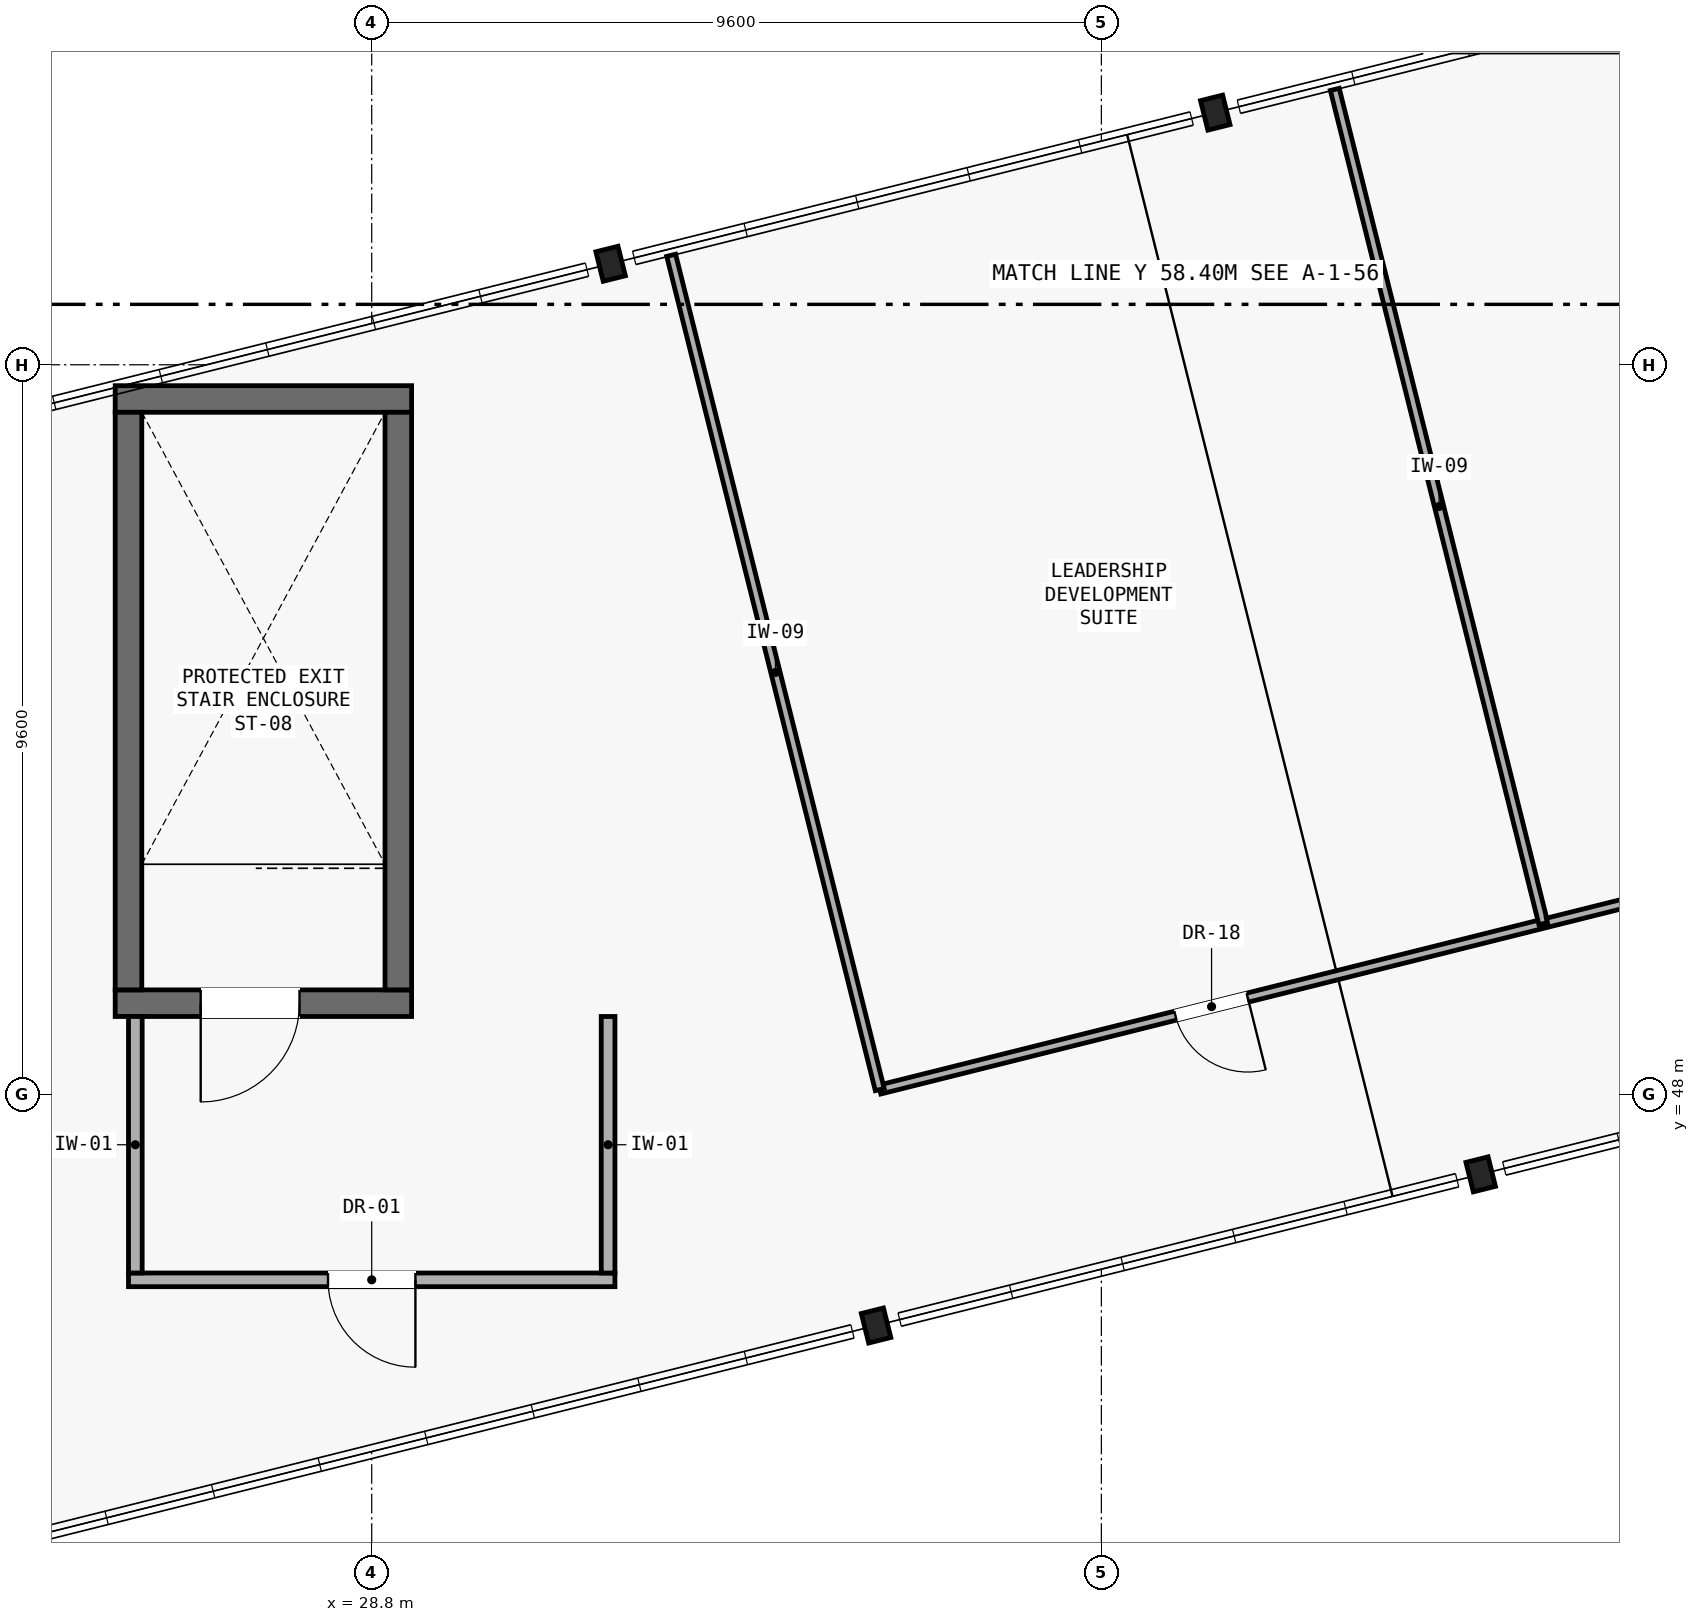
"""IFC4 building model, lengths in metres.
Left out: names, types, materials, properties, quantities, classifications, styles, units other than length and angle.
Written with IfcOpenShell. Run it as: python <this file> out.ifc"""

import sys

from ifc_helpers import new_model, si_unit, direction, frame, frame_2d, origin, origin_2d, place, context, subcontext, project, spatial, rectangle, i_section, extrude, element, fill, save


model = new_model("IFC4")
c1 = context("Model", 3, precision=1e-05, world=origin(), true_north=direction((0.0, 1.0)))
c2 = subcontext(c1, "Body", "Model", "MODEL_VIEW")
j1 = project(units=[si_unit("LENGTHUNIT", "METRE"), si_unit("PLANEANGLEUNIT", "RADIAN")], contexts=[c1])
p1 = place(None, origin())
s1 = spatial("IfcSite", under=j1, at=p1, CompositionType="ELEMENT")
p2 = place(p1, origin())
s2 = spatial("IfcBuilding", under=s1, at=p2, CompositionType="ELEMENT")
p3 = place(p2, frame((0.0, 0.0, 17.85)))
s3 = spatial("IfcBuildingStorey", under=s2, at=p3, CompositionType="ELEMENT", Elevation=17.85)
for number, where, z_axis, x_axis in (
    (1, (35.436, 44.959, 0.0), (0.0, 0.0, 1.0), (0.97, 0.243, 0.0)),
    (2, (31.943, 58.929, 0.0), (0.0, 0.0, 1.0), (0.97, 0.243, 0.0)),
    (3, (43.391, 46.948, 0.0), (0.0, 0.0, 1.0), (0.97, 0.243, 0.0)),
    (4, (39.898, 60.918, 0.0), (0.0, 0.0, 1.0), (0.97, 0.243, 0.0)),
):
    element("IfcColumn", number, at=place(p3, frame(where, z_axis=z_axis, x_axis=x_axis)), inside=s3, PredefinedType="COLUMN", context=c2, shape_type="SweptSolid", body=[
        extrude(i_section(OverallWidth=0.3, OverallDepth=0.4, WebThickness=0.013, FlangeThickness=0.024, FilletRadius=0.027, at=origin_2d()), origin(), (0.0, 0.0, 1.0), 4.2),
    ])
p4 = place(p3, frame((25.425, 49.2, 0.0), z_axis=(0.0, 0.0, 1.0), x_axis=(1.0, 0.0, 0.0)))
e5 = element("IfcWall", 5, at=p4, inside=s3, PredefinedType="SHEAR", context=c2, shape_type="SweptSolid", body=[
    extrude(rectangle(XDim=3.9, YDim=0.35, at=frame_2d((1.95, 0.0))), origin(), (0.0, 0.0, 1.0), 3.99),
])
p5 = place(p4, frame((1.125, 0.0, 0.0)))
e6 = element("IfcOpeningElement", 6, at=p5, cuts=e5, PredefinedType="OPENING", context=c2, shape_type="SweptSolid", body=[
    extrude(rectangle(XDim=1.3, YDim=2.15, at=frame_2d((0.65, 1.075))), frame((0.0, 0.185, 0.0), z_axis=(0.0, -1.0, 0.0), x_axis=(1.0, 0.0, 0.0)), (0.0, 0.0, 1.0), 0.37),
])
p6 = place(p3, frame((25.425, 57.15, 0.0), z_axis=(0.0, 0.0, 1.0), x_axis=(1.0, 0.0, 0.0)))
e7 = element("IfcWall", 7, at=p6, inside=s3, PredefinedType="SHEAR", context=c2, shape_type="SweptSolid", body=[
    extrude(rectangle(XDim=3.9, YDim=0.35, at=frame_2d((1.95, 0.0))), origin(), (0.0, 0.0, 1.0), 3.99),
])
for number, where, z_axis, x_axis in (
    (8, (25.6, 49.375, 0.0), (0.0, 0.0, 1.0), (0.0, 1.0, 0.0)),
    (9, (29.15, 49.375, 0.0), (0.0, 0.0, 1.0), (0.0, 1.0, 0.0)),
):
    element("IfcWall", number, at=place(p3, frame(where, z_axis=z_axis, x_axis=x_axis)), inside=s3, PredefinedType="SHEAR", context=c2, shape_type="SweptSolid", body=[
        extrude(rectangle(XDim=7.6, YDim=0.35, at=frame_2d((3.8, 0.0))), origin(), (0.0, 0.0, 1.0), 3.99),
    ])
p7 = place(p3, frame((25.6, 45.56, 0.0), z_axis=(0.0, 0.0, 1.0), x_axis=(1.0, 0.0, 0.0)))
e10 = element("IfcWall", 10, at=p7, inside=s3, PredefinedType="PARTITIONING", context=c2, shape_type="SweptSolid", body=[
    extrude(rectangle(XDim=6.4, YDim=0.18, at=frame_2d((3.2, 0.0))), origin(), (0.0, 0.0, 1.0), 3.99),
])
p8 = place(p7, frame((2.625, 0.0, 0.0)))
e11 = element("IfcOpeningElement", 11, at=p8, cuts=e10, PredefinedType="OPENING", context=c2, shape_type="SweptSolid", body=[
    extrude(rectangle(XDim=1.15, YDim=2.15, at=frame_2d((0.575, 1.075))), frame((0.0, 0.1, 0.0), z_axis=(0.0, -1.0, 0.0), x_axis=(1.0, 0.0, 0.0)), (0.0, 0.0, 1.0), 0.2),
])
for number, where, z_axis, x_axis in (
    (12, (25.69, 45.65, 0.0), (0.0, 0.0, 1.0), (0.0, 1.0, 0.0)),
    (13, (31.91, 45.65, 0.0), (0.0, 0.0, 1.0), (0.0, 1.0, 0.0)),
):
    element("IfcWall", number, at=place(p3, frame(where, z_axis=z_axis, x_axis=x_axis)), inside=s3, PredefinedType="PARTITIONING", context=c2, shape_type="SweptSolid", body=[
        extrude(rectangle(XDim=3.375, YDim=0.18, at=frame_2d((1.688, 0.0))), origin(), (0.0, 0.0, 1.0), 3.99),
    ])
p9 = place(p3, frame((35.484, 48.063, 0.0), z_axis=(0.0, 0.0, 1.0), x_axis=(0.970148882494, 0.242510094215, 0.0)))
e14 = element("IfcWall", 14, at=p9, inside=s3, PredefinedType="PARTITIONING", context=c2, shape_type="SweptSolid", body=[
    extrude(rectangle(XDim=9.0, YDim=0.12, at=frame_2d((4.5, 0.0))), origin(), (0.0, 0.0, 1.0), 3.99),
])
p10 = place(p9, frame((4.01, 0.0, 0.0)))
e15 = element("IfcOpeningElement", 15, at=p10, cuts=e14, PredefinedType="OPENING", context=c2, shape_type="SweptSolid", body=[
    extrude(rectangle(XDim=0.98, YDim=2.1, at=frame_2d((0.49, 1.05))), frame((0.0, 0.07, 0.0), z_axis=(0.0, -1.0, 0.0), x_axis=(1.0, 0.0, 0.0)), (0.0, 0.0, 1.0), 0.14),
])
p11 = place(p3, frame((44.216, 50.246, 0.0), z_axis=(0.0, 0.0, 1.0), x_axis=(-0.242540701841, 0.97014123093, 0.0)))
e16 = element("IfcWall", 16, at=p11, inside=s3, PredefinedType="PARTITIONING", context=c2, shape_type="SweptSolid", body=[
    extrude(rectangle(XDim=11.315, YDim=0.12, at=frame_2d((5.658, 0.0))), origin(), (0.0, 0.0, 1.0), 3.99),
])
p12 = place(p3, frame((32.74, 59.041, 0.0), z_axis=(0.0, 0.0, 1.0), x_axis=(0.242525471141, -0.970145038563, 0.0)))
e17 = element("IfcWall", 17, at=p12, inside=s3, PredefinedType="PARTITIONING", context=c2, shape_type="SweptSolid", body=[
    extrude(rectangle(XDim=11.315, YDim=0.12, at=frame_2d((5.657, 0.0))), origin(), (0.0, 0.0, 1.0), 3.99),
])
p13 = place(p3, frame((44.269, 50.26, 0.0), z_axis=(0.0, 0.0, 1.0), x_axis=(0.970143308309, 0.242532392358, 0.0)))
e18 = element("IfcWall", 18, at=p13, inside=s3, PredefinedType="PARTITIONING", context=c2, shape_type="SweptSolid", body=[
    extrude(rectangle(XDim=17.77, YDim=0.12, at=frame_2d((8.885, 0.0))), origin(), (0.0, 0.0, 1.0), 3.99),
])
p14 = place(p13, frame((8.405, 0.0, 0.0)))
e19 = element("IfcOpeningElement", 19, at=p14, cuts=e18, PredefinedType="OPENING", context=c2, shape_type="SweptSolid", body=[
    extrude(rectangle(XDim=0.96, YDim=2.08, at=frame_2d((0.48, 1.04))), frame((0.0, 0.07, 0.0), z_axis=(0.0, -1.0, 0.0), x_axis=(1.0, 0.0, 0.0)), (0.0, 0.0, 1.0), 0.14),
])
p15 = place(p5, frame((1.3, 0.0, 0.0), z_axis=(0.0, 0.0, 1.0), x_axis=(-1.0, 0.0, 0.0)))
e20 = element("IfcDoor", 20, at=p15, inside=s3, OperationType="SINGLE_SWING_LEFT", PredefinedType="DOOR", context=c2, shape_type="SweptSolid", body=[
    extrude(rectangle(XDim=1.3, YDim=2.15, at=frame_2d((0.65, 1.075))), frame((0.0, 0.025, 0.0), z_axis=(0.0, -1.0, 0.0), x_axis=(1.0, 0.0, 0.0)), (0.0, 0.0, 1.0), 0.05),
])
fill(e6, e20)
p16 = place(p8, frame((1.15, 0.0, 0.0), z_axis=(0.0, 0.0, 1.0), x_axis=(-1.0, 0.0, 0.0)))
e21 = element("IfcDoor", 21, at=p16, inside=s3, OperationType="SINGLE_SWING_RIGHT", PredefinedType="DOOR", context=c2, shape_type="SweptSolid", body=[
    extrude(rectangle(XDim=1.15, YDim=2.15, at=frame_2d((0.575, 1.075))), frame((0.0, 0.025, 0.0), z_axis=(0.0, -1.0, 0.0), x_axis=(1.0, 0.0, 0.0)), (0.0, 0.0, 1.0), 0.05),
])
fill(e11, e21)
p17 = place(p10, frame((0.98, 0.0, 0.0), z_axis=(0.0, 0.0, 1.0), x_axis=(-1.0, 0.0, 0.0)))
e22 = element("IfcDoor", 22, at=p17, inside=s3, OperationType="SINGLE_SWING_RIGHT", PredefinedType="DOOR", context=c2, shape_type="SweptSolid", body=[
    extrude(rectangle(XDim=0.98, YDim=2.1, at=frame_2d((0.49, 1.05))), frame((0.0, 0.025, 0.0), z_axis=(0.0, -1.0, 0.0), x_axis=(1.0, 0.0, 0.0)), (0.0, 0.0, 1.0), 0.05),
])
fill(e15, e22)
save(model, sys.argv[1])
